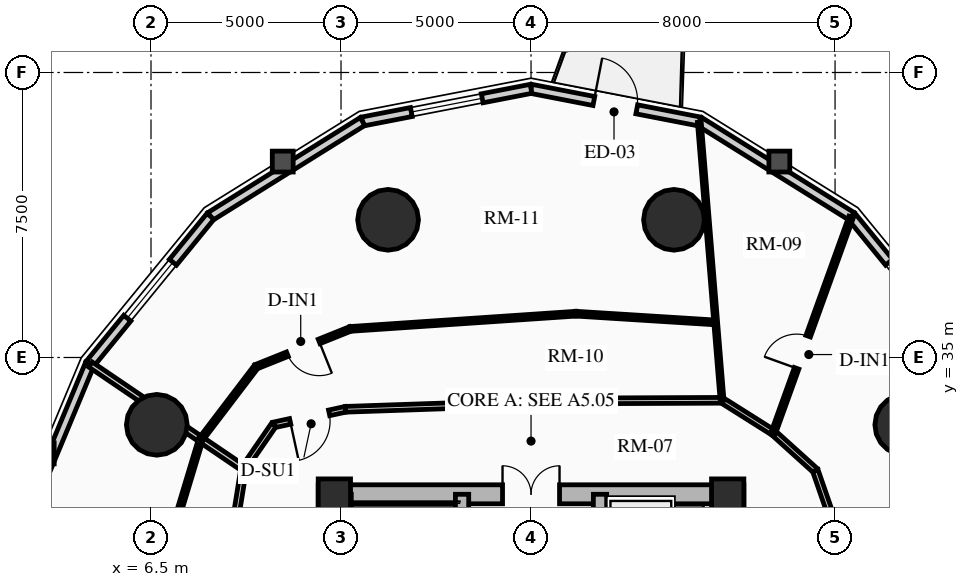
"""IFC4 building model, lengths in metres.
Left out: names, types, materials, properties, quantities, classifications, styles, units other than length and angle.
Written with IfcOpenShell. Run it as: python <this file> out.ifc"""

import sys

from ifc_helpers import new_model, si_unit, direction, frame, frame_2d, origin, origin_2d, place, context, subcontext, project, spatial, rectangle, circle, extrude, source, transform, mapped, element, fill, save


model = new_model("IFC4")
c1 = context("Model", 3, precision=1e-05, world=origin(), true_north=direction((0.0, 1.0)))
c2 = subcontext(c1, "Body", "Model", "MODEL_VIEW")
j1 = project(units=[si_unit("LENGTHUNIT", "METRE"), si_unit("PLANEANGLEUNIT", "RADIAN")], contexts=[c1])
p1 = place(None, origin())
s1 = spatial("IfcSite", under=j1, at=p1, CompositionType="ELEMENT")
p2 = place(p1, origin())
s2 = spatial("IfcBuilding", under=s1, at=p2, CompositionType="ELEMENT")
p3 = place(p2, frame((0.0, 0.0, 24.91)))
s3 = spatial("IfcBuildingStorey", under=s2, at=p3, CompositionType="ELEMENT", Elevation=24.91)
for number, where, z_axis, x_axis in (
    (1, (11.15, 17.35, 0.0), (0.0, 0.0, 1.0), (0.0, 1.0, 0.0)),
    (2, (21.85, 17.35, 0.0), (0.0, 0.0, 1.0), (0.0, 1.0, 0.0)),
):
    element("IfcWall", number, at=place(p3, frame(where, z_axis=z_axis, x_axis=x_axis)), inside=s3, PredefinedType="SHEAR", context=c2, shape_type="SweptSolid", body=[
        extrude(rectangle(XDim=14.3, YDim=0.5, at=frame_2d((7.15, 0.0))), origin(), (0.0, 0.0, 1.0), 2.91),
    ])
p4 = place(p3, frame((11.15, 31.4, 0.0), z_axis=(0.0, 0.0, 1.0), x_axis=(1.0, 0.0, 0.0)))
e3 = element("IfcWall", 3, at=p4, inside=s3, PredefinedType="SHEAR", context=c2, shape_type="SweptSolid", body=[
    extrude(rectangle(XDim=10.7, YDim=0.5, at=frame_2d((5.35, 0.0))), origin(), (0.0, 0.0, 1.0), 2.91),
])
m1 = source(origin(), c2, "Body", "SweptSolid", [
    extrude(rectangle(XDim=1.5, YDim=2.02, at=frame_2d((0.75, 1.01))), frame((0.0, 0.26, 0.0), z_axis=(0.0, -1.0, 0.0), x_axis=(1.0, 0.0, 0.0)), (0.0, 0.0, 1.0), 0.52),
])
p5 = place(p4, frame((4.6, 0.0, 0.0)))
e4 = element("IfcOpeningElement", 4, at=p5, cuts=e3, PredefinedType="OPENING", context=c2, shape_type="MappedRepresentation", body=[
    mapped(m1, transform((0.0, 0.0, 0.0), x_axis=(1.0, 0.0, 0.0), y_axis=(0.0, 1.0, 0.0), z_axis=(0.0, 0.0, 1.0), scale=1.0)),
])
p6 = place(p3, frame((14.685, 17.6, 0.0), z_axis=(0.0, 0.0, 1.0), x_axis=(0.0, 1.0, 0.0)))
e5 = element("IfcWall", 5, at=p6, inside=s3, PredefinedType="SHEAR", context=c2, shape_type="SweptSolid", body=[
    extrude(rectangle(XDim=13.8, YDim=0.35, at=frame_2d((6.9, 0.0))), origin(), (0.0, 0.0, 1.0), 2.91),
])
m2 = source(origin(), c2, "Body", "SweptSolid", [
    extrude(rectangle(XDim=1.1, YDim=2.015, at=frame_2d((0.55, 1.007))), frame((0.0, 0.185, 0.0), z_axis=(0.0, -1.0, 0.0), x_axis=(1.0, 0.0, 0.0)), (0.0, 0.0, 1.0), 0.37),
])
p7 = place(p6, frame((4.9, 0.0, 0.0)))
e6 = element("IfcOpeningElement", 6, at=p7, cuts=e5, PredefinedType="OPENING", context=c2, shape_type="MappedRepresentation", body=[
    mapped(m2, transform((0.0, 0.0, 0.0), x_axis=(1.0, 0.0, 0.0), y_axis=(0.0, 1.0, 0.0), z_axis=(0.0, 0.0, 1.0), scale=1.0)),
])
m3 = source(origin(), c2, "Body", "SweptSolid", [
    extrude(rectangle(XDim=1.15, YDim=2.02, at=frame_2d((0.575, 1.01))), frame((0.0, 0.185, 0.0), z_axis=(0.0, -1.0, 0.0), x_axis=(1.0, 0.0, 0.0)), (0.0, 0.0, 1.0), 0.37),
])
p8 = place(p6, frame((7.32, 0.0, 0.0)))
e7 = element("IfcOpeningElement", 7, at=p8, cuts=e5, PredefinedType="OPENING", context=c2, shape_type="MappedRepresentation", body=[
    mapped(m3, transform((0.0, 0.0, 0.0), x_axis=(1.0, 0.0, 0.0), y_axis=(0.0, 1.0, 0.0), z_axis=(0.0, 0.0, 1.0), scale=1.0)),
])
p9 = place(p3, frame((18.315, 17.6, 0.0), z_axis=(0.0, 0.0, 1.0), x_axis=(0.0, 1.0, 0.0)))
e8 = element("IfcWall", 8, at=p9, inside=s3, PredefinedType="SHEAR", context=c2, shape_type="SweptSolid", body=[
    extrude(rectangle(XDim=13.8, YDim=0.35, at=frame_2d((6.9, 0.0))), origin(), (0.0, 0.0, 1.0), 2.91),
])
p10 = place(p9, frame((10.025, 0.0, 0.0)))
e9 = element("IfcOpeningElement", 9, at=p10, cuts=e8, PredefinedType="OPENING", context=c2, shape_type="MappedRepresentation", body=[
    mapped(m2, transform((0.0, 0.0, 0.0), x_axis=(1.0, 0.0, 0.0), y_axis=(0.0, 1.0, 0.0), z_axis=(0.0, 0.0, 1.0), scale=1.0)),
])
p11 = place(p9, frame((12.025, 0.0, 0.0)))
e10 = element("IfcOpeningElement", 10, at=p11, cuts=e8, PredefinedType="OPENING", context=c2, shape_type="MappedRepresentation", body=[
    mapped(m2, transform((0.0, 0.0, 0.0), x_axis=(1.0, 0.0, 0.0), y_axis=(0.0, 1.0, 0.0), z_axis=(0.0, 0.0, 1.0), scale=1.0)),
])
p12 = place(p9, frame((5.33, 0.0, 0.0)))
e11 = element("IfcOpeningElement", 11, at=p12, cuts=e8, PredefinedType="OPENING", context=c2, shape_type="MappedRepresentation", body=[
    mapped(m3, transform((0.0, 0.0, 0.0), x_axis=(1.0, 0.0, 0.0), y_axis=(0.0, 1.0, 0.0), z_axis=(0.0, 0.0, 1.0), scale=1.0)),
])
p13 = place(p3, frame((11.595, 24.655, 0.0), z_axis=(0.0, 0.0, 1.0), x_axis=(0.0, 1.0, 0.0)))
e12 = element("IfcWall", 12, at=p13, inside=s3, PredefinedType="SHEAR", context=c2, shape_type="SweptSolid", body=[
    extrude(rectangle(XDim=6.745, YDim=0.35, at=frame_2d((3.373, 0.0))), origin(), (0.0, 0.0, 1.0), 2.91),
])
for number, where, z_axis, x_axis in (
    (13, (11.325, 31.38, 0.0), (0.0, 0.0, 1.0), (1.0, 0.0, 0.0)),
    (14, (21.675, 31.38, 0.0), (0.0, 0.0, 1.0), (1.0, 0.0, 0.0)),
):
    element("IfcColumn", number, at=place(p3, frame(where, z_axis=z_axis, x_axis=x_axis)), inside=s3, PredefinedType="COLUMN", context=c2, shape_type="SweptSolid", body=[
        extrude(rectangle(XDim=0.85, YDim=0.85, at=origin_2d()), origin(), (0.0, 0.0, 1.0), 2.91),
    ])
for number, where, z_axis, x_axis in (
    (15, (26.347, 33.229, 0.0), (0.0, 0.0, 1.0), (1.0, 0.0, 0.0)),
    (16, (20.261, 38.623, 0.0), (0.0, 0.0, 1.0), (1.0, 0.0, 0.0)),
    (17, (12.739, 38.623, 0.0), (0.0, 0.0, 1.0), (1.0, 0.0, 0.0)),
    (18, (6.653, 33.229, 0.0), (0.0, 0.0, 1.0), (1.0, 0.0, 0.0)),
):
    element("IfcColumn", number, at=place(p3, frame(where, z_axis=z_axis, x_axis=x_axis)), inside=s3, PredefinedType="USERDEFINED", context=c2, shape_type="SweptSolid", body=[
        extrude(circle(Radius=0.8, at=origin_2d()), origin(), (0.0, 0.0, 1.0), 2.91),
    ])
p14 = place(p3, frame((24.935, 38.714, 0.0), z_axis=(0.0, 0.0, 1.0), x_axis=(0.632588557044, -0.774488035735, 0.0)))
e19 = element("IfcWall", 19, at=p14, inside=s3, PredefinedType="SOLIDWALL", context=c2, shape_type="SweptSolid", body=[
    extrude(rectangle(XDim=5.019, YDim=0.24, at=frame_2d((2.509, 0.0))), origin(), (0.0, 0.0, 1.0), 2.073),
])
m4 = source(origin(), c2, "Body", "SweptSolid", [
    extrude(rectangle(XDim=1.9, YDim=1.35, at=frame_2d((0.95, 0.675))), frame((0.0, 0.13, 0.0), z_axis=(0.0, -1.0, 0.0), x_axis=(1.0, 0.0, 0.0)), (0.0, 0.0, 1.0), 0.26),
])
p15 = place(p14, frame((1.559, 0.0, 0.65)))
e20 = element("IfcOpeningElement", 20, at=p15, cuts=e19, PredefinedType="OPENING", context=c2, shape_type="MappedRepresentation", body=[
    mapped(m4, transform((0.0, 0.0, 0.0), x_axis=(1.0, 0.0, 0.0), y_axis=(0.0, 1.0, 0.0), z_axis=(0.0, 0.0, 1.0), scale=1.0)),
])
p16 = place(p3, frame((20.935, 41.21, 0.0), z_axis=(0.0, 0.0, 1.0), x_axis=(0.848422721916, -0.529319265601, 0.0)))
e21 = element("IfcWall", 21, at=p16, inside=s3, PredefinedType="SOLIDWALL", context=c2, shape_type="SweptSolid", body=[
    extrude(rectangle(XDim=4.715, YDim=0.24, at=frame_2d((2.357, 0.0))), origin(), (0.0, 0.0, 1.0), 2.073),
])
p17 = place(p3, frame((16.5, 42.07, 0.0), z_axis=(0.0, 0.0, 1.0), x_axis=(0.981717351035, -0.190344536766, 0.0)))
e22 = element("IfcWall", 22, at=p17, inside=s3, PredefinedType="SOLIDWALL", context=c2, shape_type="SweptSolid", body=[
    extrude(rectangle(XDim=4.517, YDim=0.24, at=frame_2d((2.259, 0.0))), origin(), (0.0, 0.0, 1.0), 2.073),
])
m5 = source(origin(), c2, "Body", "SweptSolid", [
    extrude(rectangle(XDim=1.15, YDim=2.005, at=frame_2d((0.575, 1.002))), frame((0.0, 0.13, 0.0), z_axis=(0.0, -1.0, 0.0), x_axis=(1.0, 0.0, 0.0)), (0.0, 0.0, 1.0), 0.26),
])
p18 = place(p17, frame((1.684, 0.0, 0.0)))
e23 = element("IfcOpeningElement", 23, at=p18, cuts=e22, PredefinedType="OPENING", context=c2, shape_type="MappedRepresentation", body=[
    mapped(m5, transform((0.0, 0.0, 0.0), x_axis=(1.0, 0.0, 0.0), y_axis=(0.0, 1.0, 0.0), z_axis=(0.0, 0.0, 1.0), scale=1.0)),
])
p19 = place(p3, frame((12.065, 41.21, 0.0), z_axis=(0.0, 0.0, 1.0), x_axis=(0.981717351035, 0.190344536766, 0.0)))
e24 = element("IfcWall", 24, at=p19, inside=s3, PredefinedType="SOLIDWALL", context=c2, shape_type="SweptSolid", body=[
    extrude(rectangle(XDim=4.517, YDim=0.24, at=frame_2d((2.259, 0.0))), origin(), (0.0, 0.0, 1.0), 2.073),
])
p20 = place(p19, frame((1.309, 0.0, 0.65)))
e25 = element("IfcOpeningElement", 25, at=p20, cuts=e24, PredefinedType="OPENING", context=c2, shape_type="MappedRepresentation", body=[
    mapped(m4, transform((0.0, 0.0, 0.0), x_axis=(1.0, 0.0, 0.0), y_axis=(0.0, 1.0, 0.0), z_axis=(0.0, 0.0, 1.0), scale=1.0)),
])
p21 = place(p3, frame((8.065, 38.714, 0.0), z_axis=(0.0, 0.0, 1.0), x_axis=(0.848422721916, 0.529319265601, 0.0)))
e26 = element("IfcWall", 26, at=p21, inside=s3, PredefinedType="SOLIDWALL", context=c2, shape_type="SweptSolid", body=[
    extrude(rectangle(XDim=4.715, YDim=0.24, at=frame_2d((2.357, 0.0))), origin(), (0.0, 0.0, 1.0), 2.073),
])
p22 = place(p3, frame((4.89, 34.827, 0.0), z_axis=(0.0, 0.0, 1.0), x_axis=(0.632588557044, 0.774488035735, 0.0)))
e27 = element("IfcWall", 27, at=p22, inside=s3, PredefinedType="SOLIDWALL", context=c2, shape_type="SweptSolid", body=[
    extrude(rectangle(XDim=5.019, YDim=0.24, at=frame_2d((2.509, 0.0))), origin(), (0.0, 0.0, 1.0), 2.073),
])
p23 = place(p22, frame((1.559, 0.0, 0.65)))
e28 = element("IfcOpeningElement", 28, at=p23, cuts=e27, PredefinedType="OPENING", context=c2, shape_type="MappedRepresentation", body=[
    mapped(m4, transform((0.0, 0.0, 0.0), x_axis=(1.0, 0.0, 0.0), y_axis=(0.0, 1.0, 0.0), z_axis=(0.0, 0.0, 1.0), scale=1.0)),
])
p24 = place(p3, frame((2.851, 29.929, 0.0), z_axis=(0.0, 0.0, 1.0), x_axis=(0.384255919668, 0.923226618009, 0.0)))
e29 = element("IfcWall", 29, at=p24, inside=s3, PredefinedType="SOLIDWALL", context=c2, shape_type="SweptSolid", body=[
    extrude(rectangle(XDim=5.305, YDim=0.24, at=frame_2d((2.653, 0.0))), origin(), (0.0, 0.0, 1.0), 2.073),
])
p25 = place(p3, frame((24.469, 30.614, 0.0), z_axis=(0.0, 0.0, 1.0), x_axis=(-0.327228335485, 0.944945298129, 0.0)))
e30 = element("IfcWall", 30, at=p25, inside=s3, PredefinedType="PARTITIONING", context=c2, shape_type="SweptSolid", body=[
    extrude(rectangle(XDim=1.495, YDim=0.15, at=frame_2d((0.748, 0.0))), origin(), (0.0, 0.0, 1.0), 2.205),
])
p26 = place(p3, frame((23.98, 32.027, 0.0), z_axis=(0.0, 0.0, 1.0), x_axis=(-0.742353224332, 0.670008724065, 0.0)))
e31 = element("IfcWall", 31, at=p26, inside=s3, PredefinedType="PARTITIONING", context=c2, shape_type="SweptSolid", body=[
    extrude(rectangle(XDim=1.485, YDim=0.15, at=frame_2d((0.742, 0.0))), origin(), (0.0, 0.0, 1.0), 2.159),
])
p27 = place(p3, frame((22.877, 33.022, 0.0), z_axis=(0.0, 0.0, 1.0), x_axis=(-0.845895608855, 0.533348496689, 0.0)))
e32 = element("IfcWall", 32, at=p27, inside=s3, PredefinedType="PARTITIONING", context=c2, shape_type="SweptSolid", body=[
    extrude(rectangle(XDim=1.597, YDim=0.15, at=frame_2d((0.798, 0.0))), origin(), (0.0, 0.0, 1.0), 2.205),
])
p28 = place(p3, frame((21.527, 33.873, 0.0), z_axis=(0.0, 0.0, 1.0), x_axis=(-0.999991838845, -0.004040079574, 0.0)))
e33 = element("IfcWall", 33, at=p28, inside=s3, PredefinedType="PARTITIONING", context=c2, shape_type="SweptSolid", body=[
    extrude(rectangle(XDim=3.384, YDim=0.15, at=frame_2d((1.692, 0.0))), origin(), (0.0, 0.0, 1.0), 2.159),
])
p29 = place(p3, frame((18.143, 33.86, 0.0), z_axis=(0.0, 0.0, 1.0), x_axis=(-0.999419208319, -0.034077060363, 0.0)))
e34 = element("IfcWall", 34, at=p29, inside=s3, PredefinedType="PARTITIONING", context=c2, shape_type="SweptSolid", body=[
    extrude(rectangle(XDim=6.527, YDim=0.15, at=frame_2d((3.263, 0.0))), origin(), (0.0, 0.0, 1.0), 2.159),
])
p30 = place(p3, frame((11.62, 33.637, 0.0), z_axis=(0.0, 0.0, 1.0), x_axis=(-0.97702579435, -0.213121085711, 0.0)))
e35 = element("IfcWall", 35, at=p30, inside=s3, PredefinedType="PARTITIONING", context=c2, shape_type="SweptSolid", body=[
    extrude(rectangle(XDim=1.935, YDim=0.15, at=frame_2d((0.967, 0.0))), origin(), (0.0, 0.0, 1.0), 2.159),
])
m6 = source(origin(), c2, "Body", "SweptSolid", [
    extrude(rectangle(XDim=1.05, YDim=2.015, at=frame_2d((0.525, 1.007))), frame((0.0, 0.085, 0.0), z_axis=(0.0, -1.0, 0.0), x_axis=(1.0, 0.0, 0.0)), (0.0, 0.0, 1.0), 0.17),
])
p31 = place(p30, frame((0.442, 0.0, 0.0)))
e36 = element("IfcOpeningElement", 36, at=p31, cuts=e35, PredefinedType="OPENING", context=c2, shape_type="MappedRepresentation", body=[
    mapped(m6, transform((0.0, 0.0, 0.0), x_axis=(1.0, 0.0, 0.0), y_axis=(0.0, 1.0, 0.0), z_axis=(0.0, 0.0, 1.0), scale=1.0)),
])
p32 = place(p3, frame((9.729, 33.225, 0.0), z_axis=(0.0, 0.0, 1.0), x_axis=(-0.567183649484, -0.82359134755, 0.0)))
e37 = element("IfcWall", 37, at=p32, inside=s3, PredefinedType="PARTITIONING", context=c2, shape_type="SweptSolid", body=[
    extrude(rectangle(XDim=1.392, YDim=0.15, at=frame_2d((0.696, 0.0))), origin(), (0.0, 0.0, 1.0), 2.159),
])
p33 = place(p3, frame((8.94, 32.078, 0.0), z_axis=(0.0, 0.0, 1.0), x_axis=(-0.159148467753, -0.98725466077, 0.0)))
e38 = element("IfcWall", 38, at=p33, inside=s3, PredefinedType="PARTITIONING", context=c2, shape_type="SweptSolid", body=[
    extrude(rectangle(XDim=1.554, YDim=0.15, at=frame_2d((0.777, 0.0))), origin(), (0.0, 0.0, 1.0), 2.205),
])
p34 = place(p3, frame((21.527, 33.873, 0.0), z_axis=(0.0, 0.0, 1.0), x_axis=(-0.081501553037, 0.996673214676, 0.0)))
e39 = element("IfcWall", 39, at=p34, inside=s3, PredefinedType="MOVABLE", context=c2, shape_type="SweptSolid", body=[
    extrude(rectangle(XDim=7.342, YDim=0.1, at=frame_2d((3.671, 0.0))), origin(), (0.0, 0.0, 1.0), 2.073),
])
p35 = place(p3, frame((8.94, 32.078, 0.0), z_axis=(0.0, 0.0, 1.0), x_axis=(-0.827476605417, 0.561500193666, 0.0)))
e40 = element("IfcWall", 40, at=p35, inside=s3, PredefinedType="PARTITIONING", context=c2, shape_type="SweptSolid", body=[
    extrude(rectangle(XDim=4.875, YDim=0.16, at=frame_2d((2.438, 0.0))), origin(), (0.0, 0.0, 1.0), 2.073),
])
p36 = place(p3, frame((22.877, 33.022, 0.0), z_axis=(0.0, 0.0, 1.0), x_axis=(0.339100549831, 0.94075013532, 0.0)))
e41 = element("IfcWall", 41, at=p36, inside=s3, PredefinedType="PARTITIONING", context=c2, shape_type="SweptSolid", body=[
    extrude(rectangle(XDim=6.034, YDim=0.125, at=frame_2d((3.017, 0.0))), origin(), (0.0, 0.0, 1.0), 2.073),
])
m7 = source(origin(), c2, "Body", "SweptSolid", [
    extrude(rectangle(XDim=0.9, YDim=2.005, at=frame_2d((0.45, 1.002))), frame((0.0, 0.073, 0.0), z_axis=(0.0, -1.0, 0.0), x_axis=(1.0, 0.0, 0.0)), (0.0, 0.0, 1.0), 0.145),
])
p37 = place(p36, frame((1.8, 0.0, 0.0)))
e42 = element("IfcOpeningElement", 42, at=p37, cuts=e41, PredefinedType="OPENING", context=c2, shape_type="MappedRepresentation", body=[
    mapped(m7, transform((0.0, 0.0, 0.0), x_axis=(1.0, 0.0, 0.0), y_axis=(0.0, 1.0, 0.0), z_axis=(0.0, 0.0, 1.0), scale=1.0)),
])
p38 = place(p3, frame((21.359, 35.922, 0.0), z_axis=(0.0, 0.0, 1.0), x_axis=(-0.998040956573, 0.062563959294, 0.0)))
e43 = element("IfcWall", 43, at=p38, inside=s3, PredefinedType="PARTITIONING", context=c2, shape_type="SweptSolid", body=[
    extrude(rectangle(XDim=3.684, YDim=0.125, at=frame_2d((1.842, 0.0))), origin(), (0.0, 0.0, 1.0), 2.159),
])
p39 = place(p3, frame((17.683, 36.153, 0.0), z_axis=(0.0, 0.0, 1.0), x_axis=(-0.997730540088, -0.067333270944, 0.0)))
e44 = element("IfcWall", 44, at=p39, inside=s3, PredefinedType="PARTITIONING", context=c2, shape_type="SweptSolid", body=[
    extrude(rectangle(XDim=5.95, YDim=0.125, at=frame_2d((2.975, 0.0))), origin(), (0.0, 0.0, 1.0), 2.159),
])
p40 = place(p3, frame((11.746, 35.752, 0.0), z_axis=(0.0, 0.0, 1.0), x_axis=(-0.928091790064, -0.372351486119, 0.0)))
e45 = element("IfcWall", 45, at=p40, inside=s3, PredefinedType="PARTITIONING", context=c2, shape_type="SweptSolid", body=[
    extrude(rectangle(XDim=2.672, YDim=0.125, at=frame_2d((1.336, 0.0))), origin(), (0.0, 0.0, 1.0), 2.205),
])
p41 = place(p40, frame((0.886, 0.0, 0.0)))
e46 = element("IfcOpeningElement", 46, at=p41, cuts=e45, PredefinedType="OPENING", context=c2, shape_type="MappedRepresentation", body=[
    mapped(m7, transform((0.0, 0.0, 0.0), x_axis=(1.0, 0.0, 0.0), y_axis=(0.0, 1.0, 0.0), z_axis=(0.0, 0.0, 1.0), scale=1.0)),
])
p42 = place(p3, frame((9.267, 34.757, 0.0), z_axis=(0.0, 0.0, 1.0), x_axis=(-0.60573716219, -0.795664810295, 0.0)))
e47 = element("IfcWall", 47, at=p42, inside=s3, PredefinedType="PARTITIONING", context=c2, shape_type="SweptSolid", body=[
    extrude(rectangle(XDim=2.404, YDim=0.125, at=frame_2d((1.202, 0.0))), origin(), (0.0, 0.0, 1.0), 2.159),
])
p43 = place(p3, frame((7.811, 32.845, 0.0), z_axis=(0.0, 0.0, 1.0), x_axis=(-0.289357304294, -0.957221160679, 0.0)))
e48 = element("IfcWall", 48, at=p43, inside=s3, PredefinedType="PARTITIONING", context=c2, shape_type="SweptSolid", body=[
    extrude(rectangle(XDim=2.585, YDim=0.125, at=frame_2d((1.292, 0.0))), origin(), (0.0, 0.0, 1.0), 2.159),
])
m8 = source(origin(), c2, "Body", "SweptSolid", [
    extrude(rectangle(XDim=1.9, YDim=1.35, at=frame_2d((0.95, 0.675))), frame((0.0, 0.03, 0.0), z_axis=(0.0, -1.0, 0.0), x_axis=(1.0, 0.0, 0.0)), (0.0, 0.0, 1.0), 0.06),
])
p44 = place(p15, origin())
e49 = element("IfcWindow", 49, at=p44, inside=s3, PartitioningType="DOUBLE_PANEL_VERTICAL", PredefinedType="WINDOW", context=c2, shape_type="MappedRepresentation", body=[
    mapped(m8, transform((0.0, 0.0, 0.0), x_axis=(1.0, 0.0, 0.0), y_axis=(0.0, 1.0, 0.0), z_axis=(0.0, 0.0, 1.0), scale=1.0)),
])
fill(e20, e49)
m9 = source(origin(), c2, "Body", "SweptSolid", [
    extrude(rectangle(XDim=1.15, YDim=2.005, at=frame_2d((0.575, 1.002))), frame((0.0, 0.025, 0.0), z_axis=(0.0, -1.0, 0.0), x_axis=(1.0, 0.0, 0.0)), (0.0, 0.0, 1.0), 0.05),
])
p45 = place(p18, origin())
e50 = element("IfcDoor", 50, at=p45, inside=s3, OperationType="SINGLE_SWING_LEFT", PredefinedType="DOOR", context=c2, shape_type="MappedRepresentation", body=[
    mapped(m9, transform((0.0, 0.0, 0.0), x_axis=(1.0, 0.0, 0.0), y_axis=(0.0, 1.0, 0.0), z_axis=(0.0, 0.0, 1.0), scale=1.0)),
])
fill(e23, e50)
p46 = place(p20, origin())
e51 = element("IfcWindow", 51, at=p46, inside=s3, PartitioningType="DOUBLE_PANEL_VERTICAL", PredefinedType="WINDOW", context=c2, shape_type="MappedRepresentation", body=[
    mapped(m8, transform((0.0, 0.0, 0.0), x_axis=(1.0, 0.0, 0.0), y_axis=(0.0, 1.0, 0.0), z_axis=(0.0, 0.0, 1.0), scale=1.0)),
])
fill(e25, e51)
p47 = place(p23, origin())
e52 = element("IfcWindow", 52, at=p47, inside=s3, PartitioningType="DOUBLE_PANEL_VERTICAL", PredefinedType="WINDOW", context=c2, shape_type="MappedRepresentation", body=[
    mapped(m8, transform((0.0, 0.0, 0.0), x_axis=(1.0, 0.0, 0.0), y_axis=(0.0, 1.0, 0.0), z_axis=(0.0, 0.0, 1.0), scale=1.0)),
])
fill(e28, e52)
m10 = source(origin(), c2, "Body", "SweptSolid", [
    extrude(rectangle(XDim=1.5, YDim=2.02, at=frame_2d((0.75, 1.01))), frame((0.0, 0.025, 0.0), z_axis=(0.0, -1.0, 0.0), x_axis=(1.0, 0.0, 0.0)), (0.0, 0.0, 1.0), 0.05),
])
p48 = place(p5, origin())
e53 = element("IfcDoor", 53, at=p48, inside=s3, OperationType="DOUBLE_DOOR_SINGLE_SWING", PredefinedType="DOOR", context=c2, shape_type="MappedRepresentation", body=[
    mapped(m10, transform((0.0, 0.0, 0.0), x_axis=(1.0, 0.0, 0.0), y_axis=(0.0, 1.0, 0.0), z_axis=(0.0, 0.0, 1.0), scale=1.0)),
])
fill(e4, e53)
m11 = source(origin(), c2, "Body", "SweptSolid", [
    extrude(rectangle(XDim=0.9, YDim=2.005, at=frame_2d((0.45, 1.002))), frame((0.0, 0.025, 0.0), z_axis=(0.0, -1.0, 0.0), x_axis=(1.0, 0.0, 0.0)), (0.0, 0.0, 1.0), 0.05),
])
p49 = place(p37, origin())
e54 = element("IfcDoor", 54, at=p49, inside=s3, OperationType="SINGLE_SWING_LEFT", PredefinedType="DOOR", context=c2, shape_type="MappedRepresentation", body=[
    mapped(m11, transform((0.0, 0.0, 0.0), x_axis=(1.0, 0.0, 0.0), y_axis=(0.0, 1.0, 0.0), z_axis=(0.0, 0.0, 1.0), scale=1.0)),
])
fill(e42, e54)
m12 = source(origin(), c2, "Body", "SweptSolid", [
    extrude(rectangle(XDim=1.05, YDim=2.015, at=frame_2d((0.525, 1.007))), frame((0.0, 0.025, 0.0), z_axis=(0.0, -1.0, 0.0), x_axis=(1.0, 0.0, 0.0)), (0.0, 0.0, 1.0), 0.05),
])
p50 = place(p31, origin())
e55 = element("IfcDoor", 55, at=p50, inside=s3, OperationType="SINGLE_SWING_RIGHT", PredefinedType="DOOR", context=c2, shape_type="MappedRepresentation", body=[
    mapped(m12, transform((0.0, 0.0, 0.0), x_axis=(1.0, 0.0, 0.0), y_axis=(0.0, 1.0, 0.0), z_axis=(0.0, 0.0, 1.0), scale=1.0)),
])
fill(e36, e55)
p51 = place(p41, origin())
e56 = element("IfcDoor", 56, at=p51, inside=s3, OperationType="SINGLE_SWING_LEFT", PredefinedType="DOOR", context=c2, shape_type="MappedRepresentation", body=[
    mapped(m11, transform((0.0, 0.0, 0.0), x_axis=(1.0, 0.0, 0.0), y_axis=(0.0, 1.0, 0.0), z_axis=(0.0, 0.0, 1.0), scale=1.0)),
])
fill(e46, e56)
save(model, sys.argv[1])
